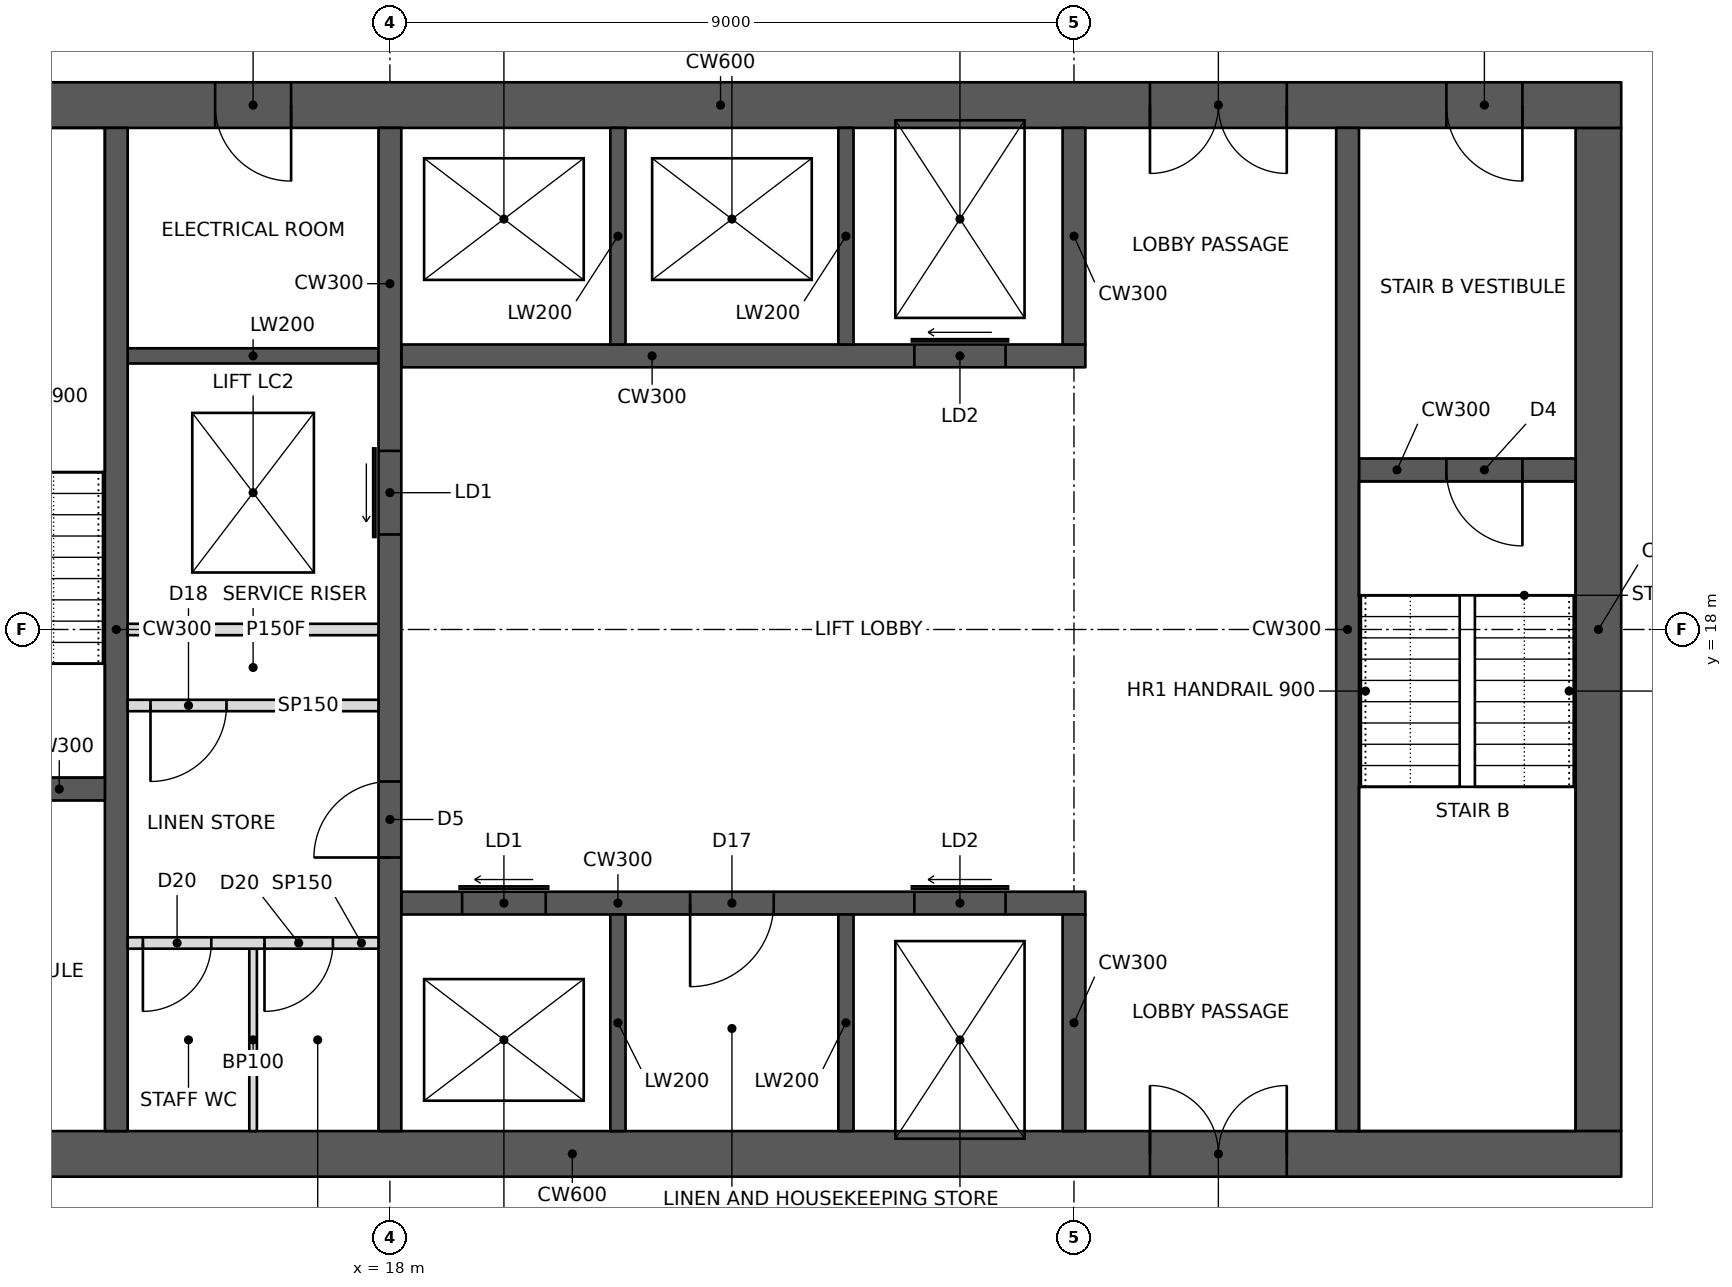
"""IFC4 building model, lengths in metres.
Left out: names, types, materials, properties, quantities, classifications, styles, units other than length and angle.
Written with IfcOpenShell. Run it as: python <this file> out.ifc"""

import sys

from ifc_helpers import new_model, si_unit, direction, frame, frame_2d, origin, place, context, subcontext, project, spatial, rectangle, extrude, element, fill, save


model = new_model("IFC4")
c1 = context("Model", 3, precision=1e-05, world=origin(), true_north=direction((0.0, 1.0)))
c2 = subcontext(c1, "Body", "Model", "MODEL_VIEW")
j1 = project(units=[si_unit("LENGTHUNIT", "METRE"), si_unit("PLANEANGLEUNIT", "RADIAN")], contexts=[c1])
p1 = place(None, origin())
s1 = spatial("IfcSite", under=j1, at=p1, CompositionType="ELEMENT")
p2 = place(p1, origin())
s2 = spatial("IfcBuilding", under=s1, at=p2, CompositionType="ELEMENT")
p3 = place(p2, frame((0.0, 0.0, 163.8)))
s3 = spatial("IfcBuildingStorey", under=s2, at=p3, CompositionType="ELEMENT", Elevation=163.8)
p4 = place(p3, frame((10.8, 11.1, 0.0), z_axis=(0.0, 0.0, 1.0), x_axis=(1.0, 0.0, 0.0)))
e1 = element("IfcWall", 1, at=p4, inside=s3, PredefinedType="SHEAR", context=c2, shape_type="SweptSolid", body=[
    extrude(rectangle(XDim=23.4, YDim=0.6, at=frame_2d((11.7, 0.0))), origin(), (0.0, 0.0, 1.0), 3.4),
])
p5 = place(p4, frame((1.0, 0.0, 0.0)))
e2 = element("IfcOpeningElement", 2, at=p5, cuts=e1, PredefinedType="OPENING", context=c2, shape_type="SweptSolid", body=[
    extrude(rectangle(XDim=1.0, YDim=2.1, at=frame_2d((0.5, 1.05))), frame((0.0, 0.31, 0.0), z_axis=(0.0, -1.0, 0.0), x_axis=(1.0, 0.0, 0.0)), (0.0, 0.0, 1.0), 0.62),
])
p6 = place(p4, frame((17.2, 0.0, 0.0)))
e3 = element("IfcOpeningElement", 3, at=p6, cuts=e1, PredefinedType="OPENING", context=c2, shape_type="SweptSolid", body=[
    extrude(rectangle(XDim=1.8, YDim=2.1, at=frame_2d((0.9, 1.05))), frame((0.0, 0.31, 0.0), z_axis=(0.0, -1.0, 0.0), x_axis=(1.0, 0.0, 0.0)), (0.0, 0.0, 1.0), 0.62),
])
p7 = place(p3, frame((10.8, 24.9, 0.0), z_axis=(0.0, 0.0, 1.0), x_axis=(1.0, 0.0, 0.0)))
e4 = element("IfcWall", 4, at=p7, inside=s3, PredefinedType="SHEAR", context=c2, shape_type="SweptSolid", body=[
    extrude(rectangle(XDim=23.4, YDim=0.6, at=frame_2d((11.7, 0.0))), origin(), (0.0, 0.0, 1.0), 3.4),
])
p8 = place(p7, frame((17.2, 0.0, 0.0)))
e5 = element("IfcOpeningElement", 5, at=p8, cuts=e4, PredefinedType="OPENING", context=c2, shape_type="SweptSolid", body=[
    extrude(rectangle(XDim=1.8, YDim=2.1, at=frame_2d((0.9, 1.05))), frame((0.0, 0.31, 0.0), z_axis=(0.0, -1.0, 0.0), x_axis=(1.0, 0.0, 0.0)), (0.0, 0.0, 1.0), 0.62),
])
p9 = place(p7, frame((21.1, 0.0, 0.0)))
e6 = element("IfcOpeningElement", 6, at=p9, cuts=e4, PredefinedType="OPENING", context=c2, shape_type="SweptSolid", body=[
    extrude(rectangle(XDim=1.0, YDim=2.1, at=frame_2d((0.5, 1.05))), frame((0.0, 0.31, 0.0), z_axis=(0.0, -1.0, 0.0), x_axis=(1.0, 0.0, 0.0)), (0.0, 0.0, 1.0), 0.62),
])
p10 = place(p7, frame((4.9, 0.0, 0.0)))
e7 = element("IfcOpeningElement", 7, at=p10, cuts=e4, PredefinedType="OPENING", context=c2, shape_type="SweptSolid", body=[
    extrude(rectangle(XDim=1.0, YDim=2.1, at=frame_2d((0.5, 1.05))), frame((0.0, 0.31, 0.0), z_axis=(0.0, -1.0, 0.0), x_axis=(1.0, 0.0, 0.0)), (0.0, 0.0, 1.0), 0.62),
])
p11 = place(p3, frame((33.9, 11.4, 0.0), z_axis=(0.0, 0.0, 1.0), x_axis=(0.0, 1.0, 0.0)))
e8 = element("IfcWall", 8, at=p11, inside=s3, PredefinedType="SHEAR", context=c2, shape_type="SweptSolid", body=[
    extrude(rectangle(XDim=13.2, YDim=0.6, at=frame_2d((6.6, 0.0))), origin(), (0.0, 0.0, 1.0), 3.4),
])
p12 = place(p3, frame((14.4, 11.4, 0.0), z_axis=(0.0, 0.0, 1.0), x_axis=(0.0, 1.0, 0.0)))
e9 = element("IfcWall", 9, at=p12, inside=s3, PredefinedType="SHEAR", context=c2, shape_type="SweptSolid", body=[
    extrude(rectangle(XDim=13.2, YDim=0.3, at=frame_2d((6.6, 0.0))), origin(), (0.0, 0.0, 1.0), 3.4),
])
p13 = place(p3, frame((11.4, 15.9, 0.0), z_axis=(0.0, 0.0, 1.0), x_axis=(1.0, 0.0, 0.0)))
e10 = element("IfcWall", 10, at=p13, inside=s3, PredefinedType="SHEAR", context=c2, shape_type="SweptSolid", body=[
    extrude(rectangle(XDim=2.85, YDim=0.3, at=frame_2d((1.425, 0.0))), origin(), (0.0, 0.0, 1.0), 3.4),
])
p14 = place(p13, frame((0.5, 0.0, 0.0)))
e11 = element("IfcOpeningElement", 11, at=p14, cuts=e10, PredefinedType="OPENING", context=c2, shape_type="SweptSolid", body=[
    extrude(rectangle(XDim=1.0, YDim=2.1, at=frame_2d((0.5, 1.05))), frame((0.0, 0.16, 0.0), z_axis=(0.0, -1.0, 0.0), x_axis=(1.0, 0.0, 0.0)), (0.0, 0.0, 1.0), 0.32),
])
p15 = place(p3, frame((18.0, 11.4, 0.0), z_axis=(0.0, 0.0, 1.0), x_axis=(0.0, 1.0, 0.0)))
e12 = element("IfcWall", 12, at=p15, inside=s3, PredefinedType="SHEAR", context=c2, shape_type="SweptSolid", body=[
    extrude(rectangle(XDim=13.2, YDim=0.3, at=frame_2d((6.6, 0.0))), origin(), (0.0, 0.0, 1.0), 3.4),
])
p16 = place(p15, frame((3.6, 0.0, 0.0)))
e13 = element("IfcOpeningElement", 13, at=p16, cuts=e12, PredefinedType="OPENING", context=c2, shape_type="SweptSolid", body=[
    extrude(rectangle(XDim=1.0, YDim=2.1, at=frame_2d((0.5, 1.05))), frame((0.0, 0.16, 0.0), z_axis=(0.0, -1.0, 0.0), x_axis=(1.0, 0.0, 0.0)), (0.0, 0.0, 1.0), 0.32),
])
p17 = place(p15, frame((7.85, 0.0, 0.0)))
e14 = element("IfcOpeningElement", 14, at=p17, cuts=e12, PredefinedType="OPENING", context=c2, shape_type="SweptSolid", body=[
    extrude(rectangle(XDim=1.1, YDim=2.1, at=frame_2d((0.55, 1.05))), frame((0.0, 0.16, 0.0), z_axis=(0.0, -1.0, 0.0), x_axis=(1.0, 0.0, 0.0)), (0.0, 0.0, 1.0), 0.32),
])
p18 = place(p3, frame((14.55, 18.0, 0.0), z_axis=(0.0, 0.0, 1.0), x_axis=(1.0, 0.0, 0.0)))
e15 = element("IfcWall", 15, at=p18, inside=s3, PredefinedType="PARTITIONING", context=c2, shape_type="SweptSolid", body=[
    extrude(rectangle(XDim=3.3, YDim=0.15, at=frame_2d((1.65, 0.0))), origin(), (0.0, 0.0, 1.0), 3.2),
])
p19 = place(p3, frame((18.15, 14.4, 0.0), z_axis=(0.0, 0.0, 1.0), x_axis=(1.0, 0.0, 0.0)))
e16 = element("IfcWall", 16, at=p19, inside=s3, PredefinedType="SHEAR", context=c2, shape_type="SweptSolid", body=[
    extrude(rectangle(XDim=9.0, YDim=0.3, at=frame_2d((4.5, 0.0))), origin(), (0.0, 0.0, 1.0), 3.4),
])
p20 = place(p19, frame((0.8, 0.0, 0.0)))
e17 = element("IfcOpeningElement", 17, at=p20, cuts=e16, PredefinedType="OPENING", context=c2, shape_type="SweptSolid", body=[
    extrude(rectangle(XDim=1.1, YDim=2.1, at=frame_2d((0.55, 1.05))), frame((0.0, 0.16, 0.0), z_axis=(0.0, -1.0, 0.0), x_axis=(1.0, 0.0, 0.0)), (0.0, 0.0, 1.0), 0.32),
])
p21 = place(p19, frame((6.75, 0.0, 0.0)))
e18 = element("IfcOpeningElement", 18, at=p21, cuts=e16, PredefinedType="OPENING", context=c2, shape_type="SweptSolid", body=[
    extrude(rectangle(XDim=1.2, YDim=2.1, at=frame_2d((0.6, 1.05))), frame((0.0, 0.16, 0.0), z_axis=(0.0, -1.0, 0.0), x_axis=(1.0, 0.0, 0.0)), (0.0, 0.0, 1.0), 0.32),
])
p22 = place(p19, frame((3.8, 0.0, 0.0)))
e19 = element("IfcOpeningElement", 19, at=p22, cuts=e16, PredefinedType="OPENING", context=c2, shape_type="SweptSolid", body=[
    extrude(rectangle(XDim=1.1, YDim=2.1, at=frame_2d((0.55, 1.05))), frame((0.0, 0.16, 0.0), z_axis=(0.0, -1.0, 0.0), x_axis=(1.0, 0.0, 0.0)), (0.0, 0.0, 1.0), 0.32),
])
p23 = place(p3, frame((27.0, 11.4, 0.0), z_axis=(0.0, 0.0, 1.0), x_axis=(0.0, 1.0, 0.0)))
e20 = element("IfcWall", 20, at=p23, inside=s3, PredefinedType="SHEAR", context=c2, shape_type="SweptSolid", body=[
    extrude(rectangle(XDim=2.85, YDim=0.3, at=frame_2d((1.425, 0.0))), origin(), (0.0, 0.0, 1.0), 3.4),
])
for number, where, z_axis, x_axis in (
    (21, (21.0, 11.4, 0.0), (0.0, 0.0, 1.0), (0.0, 1.0, 0.0)),
    (22, (24.0, 11.4, 0.0), (0.0, 0.0, 1.0), (0.0, 1.0, 0.0)),
):
    element("IfcWall", number, at=place(p3, frame(where, z_axis=z_axis, x_axis=x_axis)), inside=s3, PredefinedType="SHEAR", context=c2, shape_type="SweptSolid", body=[
        extrude(rectangle(XDim=2.85, YDim=0.2, at=frame_2d((1.425, 0.0))), origin(), (0.0, 0.0, 1.0), 3.4),
    ])
p24 = place(p3, frame((18.15, 21.6, 0.0), z_axis=(0.0, 0.0, 1.0), x_axis=(1.0, 0.0, 0.0)))
e23 = element("IfcWall", 23, at=p24, inside=s3, PredefinedType="SHEAR", context=c2, shape_type="SweptSolid", body=[
    extrude(rectangle(XDim=9.0, YDim=0.3, at=frame_2d((4.5, 0.0))), origin(), (0.0, 0.0, 1.0), 3.4),
])
p25 = place(p24, frame((6.75, 0.0, 0.0)))
e24 = element("IfcOpeningElement", 24, at=p25, cuts=e23, PredefinedType="OPENING", context=c2, shape_type="SweptSolid", body=[
    extrude(rectangle(XDim=1.2, YDim=2.1, at=frame_2d((0.6, 1.05))), frame((0.0, 0.16, 0.0), z_axis=(0.0, -1.0, 0.0), x_axis=(1.0, 0.0, 0.0)), (0.0, 0.0, 1.0), 0.32),
])
p26 = place(p3, frame((27.0, 21.75, 0.0), z_axis=(0.0, 0.0, 1.0), x_axis=(0.0, 1.0, 0.0)))
e25 = element("IfcWall", 25, at=p26, inside=s3, PredefinedType="SHEAR", context=c2, shape_type="SweptSolid", body=[
    extrude(rectangle(XDim=2.85, YDim=0.3, at=frame_2d((1.425, 0.0))), origin(), (0.0, 0.0, 1.0), 3.4),
])
for number, where, z_axis, x_axis in (
    (26, (21.0, 21.75, 0.0), (0.0, 0.0, 1.0), (0.0, 1.0, 0.0)),
    (27, (24.0, 21.75, 0.0), (0.0, 0.0, 1.0), (0.0, 1.0, 0.0)),
):
    element("IfcWall", number, at=place(p3, frame(where, z_axis=z_axis, x_axis=x_axis)), inside=s3, PredefinedType="SHEAR", context=c2, shape_type="SweptSolid", body=[
        extrude(rectangle(XDim=2.85, YDim=0.2, at=frame_2d((1.425, 0.0))), origin(), (0.0, 0.0, 1.0), 3.4),
    ])
p27 = place(p3, frame((30.6, 11.4, 0.0), z_axis=(0.0, 0.0, 1.0), x_axis=(0.0, 1.0, 0.0)))
e28 = element("IfcWall", 28, at=p27, inside=s3, PredefinedType="SHEAR", context=c2, shape_type="SweptSolid", body=[
    extrude(rectangle(XDim=13.2, YDim=0.3, at=frame_2d((6.6, 0.0))), origin(), (0.0, 0.0, 1.0), 3.4),
])
p28 = place(p3, frame((30.75, 20.1, 0.0), z_axis=(0.0, 0.0, 1.0), x_axis=(1.0, 0.0, 0.0)))
e29 = element("IfcWall", 29, at=p28, inside=s3, PredefinedType="SHEAR", context=c2, shape_type="SweptSolid", body=[
    extrude(rectangle(XDim=2.85, YDim=0.3, at=frame_2d((1.425, 0.0))), origin(), (0.0, 0.0, 1.0), 3.4),
])
p29 = place(p28, frame((1.15, 0.0, 0.0)))
e30 = element("IfcOpeningElement", 30, at=p29, cuts=e29, PredefinedType="OPENING", context=c2, shape_type="SweptSolid", body=[
    extrude(rectangle(XDim=1.0, YDim=2.1, at=frame_2d((0.5, 1.05))), frame((0.0, 0.16, 0.0), z_axis=(0.0, -1.0, 0.0), x_axis=(1.0, 0.0, 0.0)), (0.0, 0.0, 1.0), 0.32),
])
p30 = place(p3, frame((14.55, 21.6, 0.0), z_axis=(0.0, 0.0, 1.0), x_axis=(1.0, 0.0, 0.0)))
e31 = element("IfcWall", 31, at=p30, inside=s3, PredefinedType="SHEAR", context=c2, shape_type="SweptSolid", body=[
    extrude(rectangle(XDim=3.3, YDim=0.2, at=frame_2d((1.65, 0.0))), origin(), (0.0, 0.0, 1.0), 3.4),
])
p31 = place(p3, frame((14.55, 17.0, 0.0), z_axis=(0.0, 0.0, 1.0), x_axis=(1.0, 0.0, 0.0)))
e32 = element("IfcWall", 32, at=p31, inside=s3, PredefinedType="PARTITIONING", context=c2, shape_type="SweptSolid", body=[
    extrude(rectangle(XDim=3.3, YDim=0.15, at=frame_2d((1.65, 0.0))), origin(), (0.0, 0.0, 1.0), 3.2),
])
p32 = place(p31, frame((0.3, 0.0, 0.0)))
e33 = element("IfcOpeningElement", 33, at=p32, cuts=e32, PredefinedType="OPENING", context=c2, shape_type="SweptSolid", body=[
    extrude(rectangle(XDim=1.0, YDim=2.1, at=frame_2d((0.5, 1.05))), frame((0.0, 0.085, 0.0), z_axis=(0.0, -1.0, 0.0), x_axis=(1.0, 0.0, 0.0)), (0.0, 0.0, 1.0), 0.17),
])
p33 = place(p3, frame((14.55, 13.875, 0.0), z_axis=(0.0, 0.0, 1.0), x_axis=(1.0, 0.0, 0.0)))
e34 = element("IfcWall", 34, at=p33, inside=s3, PredefinedType="PARTITIONING", context=c2, shape_type="SweptSolid", body=[
    extrude(rectangle(XDim=3.3, YDim=0.15, at=frame_2d((1.65, 0.0))), origin(), (0.0, 0.0, 1.0), 3.2),
])
p34 = place(p33, frame((0.2, 0.0, 0.0)))
e35 = element("IfcOpeningElement", 35, at=p34, cuts=e34, PredefinedType="OPENING", context=c2, shape_type="SweptSolid", body=[
    extrude(rectangle(XDim=0.9, YDim=2.1, at=frame_2d((0.45, 1.05))), frame((0.0, 0.085, 0.0), z_axis=(0.0, -1.0, 0.0), x_axis=(1.0, 0.0, 0.0)), (0.0, 0.0, 1.0), 0.17),
])
p35 = place(p33, frame((1.8, 0.0, 0.0)))
e36 = element("IfcOpeningElement", 36, at=p35, cuts=e34, PredefinedType="OPENING", context=c2, shape_type="SweptSolid", body=[
    extrude(rectangle(XDim=0.9, YDim=2.1, at=frame_2d((0.45, 1.05))), frame((0.0, 0.085, 0.0), z_axis=(0.0, -1.0, 0.0), x_axis=(1.0, 0.0, 0.0)), (0.0, 0.0, 1.0), 0.17),
])
p36 = place(p3, frame((16.2, 11.4, 0.0), z_axis=(0.0, 0.0, 1.0), x_axis=(0.0, 1.0, 0.0)))
e37 = element("IfcWall", 37, at=p36, inside=s3, PredefinedType="PARTITIONING", context=c2, shape_type="SweptSolid", body=[
    extrude(rectangle(XDim=2.4, YDim=0.1, at=frame_2d((1.2, 0.0))), origin(), (0.0, 0.0, 1.0), 3.2),
])
p37 = place(p32, frame((1.0, 0.0, 0.0), z_axis=(0.0, 0.0, 1.0), x_axis=(-1.0, 0.0, 0.0)))
e38 = element("IfcDoor", 38, at=p37, inside=s3, OperationType="SINGLE_SWING_RIGHT", PredefinedType="DOOR", context=c2, shape_type="SweptSolid", body=[
    extrude(rectangle(XDim=1.0, YDim=2.1, at=frame_2d((0.5, 1.05))), frame((0.0, 0.025, 0.0), z_axis=(0.0, -1.0, 0.0), x_axis=(1.0, 0.0, 0.0)), (0.0, 0.0, 1.0), 0.05),
])
fill(e33, e38)
p38 = place(p34, frame((0.9, 0.0, 0.0), z_axis=(0.0, 0.0, 1.0), x_axis=(-1.0, 0.0, 0.0)))
e39 = element("IfcDoor", 39, at=p38, inside=s3, OperationType="SINGLE_SWING_RIGHT", PredefinedType="DOOR", context=c2, shape_type="SweptSolid", body=[
    extrude(rectangle(XDim=0.9, YDim=2.1, at=frame_2d((0.45, 1.05))), frame((0.0, 0.025, 0.0), z_axis=(0.0, -1.0, 0.0), x_axis=(1.0, 0.0, 0.0)), (0.0, 0.0, 1.0), 0.05),
])
fill(e35, e39)
p39 = place(p35, frame((0.9, 0.0, 0.0), z_axis=(0.0, 0.0, 1.0), x_axis=(-1.0, 0.0, 0.0)))
e40 = element("IfcDoor", 40, at=p39, inside=s3, OperationType="SINGLE_SWING_RIGHT", PredefinedType="DOOR", context=c2, shape_type="SweptSolid", body=[
    extrude(rectangle(XDim=0.9, YDim=2.1, at=frame_2d((0.45, 1.05))), frame((0.0, 0.025, 0.0), z_axis=(0.0, -1.0, 0.0), x_axis=(1.0, 0.0, 0.0)), (0.0, 0.0, 1.0), 0.05),
])
fill(e36, e40)
p40 = place(p6, origin())
e41 = element("IfcDoor", 41, at=p40, inside=s3, OperationType="DOUBLE_DOOR_SINGLE_SWING", PredefinedType="DOOR", context=c2, shape_type="SweptSolid", body=[
    extrude(rectangle(XDim=1.8, YDim=2.1, at=frame_2d((0.9, 1.05))), frame((0.0, 0.025, 0.0), z_axis=(0.0, -1.0, 0.0), x_axis=(1.0, 0.0, 0.0)), (0.0, 0.0, 1.0), 0.05),
])
fill(e3, e41)
p41 = place(p8, frame((1.8, 0.0, 0.0), z_axis=(0.0, 0.0, 1.0), x_axis=(-1.0, 0.0, 0.0)))
e42 = element("IfcDoor", 42, at=p41, inside=s3, OperationType="DOUBLE_DOOR_SINGLE_SWING", PredefinedType="DOOR", context=c2, shape_type="SweptSolid", body=[
    extrude(rectangle(XDim=1.8, YDim=2.1, at=frame_2d((0.9, 1.05))), frame((0.0, 0.025, 0.0), z_axis=(0.0, -1.0, 0.0), x_axis=(1.0, 0.0, 0.0)), (0.0, 0.0, 1.0), 0.05),
])
fill(e5, e42)
p42 = place(p9, frame((1.0, 0.0, 0.0), z_axis=(0.0, 0.0, 1.0), x_axis=(-1.0, 0.0, 0.0)))
e43 = element("IfcDoor", 43, at=p42, inside=s3, OperationType="SINGLE_SWING_LEFT", PredefinedType="DOOR", context=c2, shape_type="SweptSolid", body=[
    extrude(rectangle(XDim=1.0, YDim=2.1, at=frame_2d((0.5, 1.05))), frame((0.0, 0.025, 0.0), z_axis=(0.0, -1.0, 0.0), x_axis=(1.0, 0.0, 0.0)), (0.0, 0.0, 1.0), 0.05),
])
fill(e6, e43)
p43 = place(p29, frame((1.0, 0.0, 0.0), z_axis=(0.0, 0.0, 1.0), x_axis=(-1.0, 0.0, 0.0)))
e44 = element("IfcDoor", 44, at=p43, inside=s3, OperationType="SINGLE_SWING_LEFT", PredefinedType="DOOR", context=c2, shape_type="SweptSolid", body=[
    extrude(rectangle(XDim=1.0, YDim=2.1, at=frame_2d((0.5, 1.05))), frame((0.0, 0.025, 0.0), z_axis=(0.0, -1.0, 0.0), x_axis=(1.0, 0.0, 0.0)), (0.0, 0.0, 1.0), 0.05),
])
fill(e30, e44)
p44 = place(p16, origin())
e45 = element("IfcDoor", 45, at=p44, inside=s3, OperationType="SINGLE_SWING_LEFT", PredefinedType="DOOR", context=c2, shape_type="SweptSolid", body=[
    extrude(rectangle(XDim=1.0, YDim=2.1, at=frame_2d((0.5, 1.05))), frame((0.0, 0.025, 0.0), z_axis=(0.0, -1.0, 0.0), x_axis=(1.0, 0.0, 0.0)), (0.0, 0.0, 1.0), 0.05),
])
fill(e13, e45)
p45 = place(p10, frame((1.0, 0.0, 0.0), z_axis=(0.0, 0.0, 1.0), x_axis=(-1.0, 0.0, 0.0)))
e46 = element("IfcDoor", 46, at=p45, inside=s3, OperationType="SINGLE_SWING_LEFT", PredefinedType="DOOR", context=c2, shape_type="SweptSolid", body=[
    extrude(rectangle(XDim=1.0, YDim=2.1, at=frame_2d((0.5, 1.05))), frame((0.0, 0.025, 0.0), z_axis=(0.0, -1.0, 0.0), x_axis=(1.0, 0.0, 0.0)), (0.0, 0.0, 1.0), 0.05),
])
fill(e7, e46)
p46 = place(p20, origin())
e47 = element("IfcDoor", 47, at=p46, inside=s3, OperationType="SLIDING_TO_LEFT", PredefinedType="DOOR", context=c2, shape_type="SweptSolid", body=[
    extrude(rectangle(XDim=1.1, YDim=2.1, at=frame_2d((0.55, 1.05))), frame((0.0, 0.025, 0.0), z_axis=(0.0, -1.0, 0.0), x_axis=(1.0, 0.0, 0.0)), (0.0, 0.0, 1.0), 0.05),
])
fill(e17, e47)
p47 = place(p17, origin())
e48 = element("IfcDoor", 48, at=p47, inside=s3, OperationType="SLIDING_TO_LEFT", PredefinedType="DOOR", context=c2, shape_type="SweptSolid", body=[
    extrude(rectangle(XDim=1.1, YDim=2.1, at=frame_2d((0.55, 1.05))), frame((0.0, 0.025, 0.0), z_axis=(0.0, -1.0, 0.0), x_axis=(1.0, 0.0, 0.0)), (0.0, 0.0, 1.0), 0.05),
])
fill(e14, e48)
p48 = place(p21, origin())
e49 = element("IfcDoor", 49, at=p48, inside=s3, OperationType="SLIDING_TO_LEFT", PredefinedType="DOOR", context=c2, shape_type="SweptSolid", body=[
    extrude(rectangle(XDim=1.2, YDim=2.1, at=frame_2d((0.6, 1.05))), frame((0.0, 0.025, 0.0), z_axis=(0.0, -1.0, 0.0), x_axis=(1.0, 0.0, 0.0)), (0.0, 0.0, 1.0), 0.05),
])
fill(e18, e49)
p49 = place(p25, origin())
e50 = element("IfcDoor", 50, at=p49, inside=s3, OperationType="SLIDING_TO_LEFT", PredefinedType="DOOR", context=c2, shape_type="SweptSolid", body=[
    extrude(rectangle(XDim=1.2, YDim=2.1, at=frame_2d((0.6, 1.05))), frame((0.0, 0.025, 0.0), z_axis=(0.0, -1.0, 0.0), x_axis=(1.0, 0.0, 0.0)), (0.0, 0.0, 1.0), 0.05),
])
fill(e24, e50)
p50 = place(p22, frame((1.1, 0.0, 0.0), z_axis=(0.0, 0.0, 1.0), x_axis=(-1.0, 0.0, 0.0)))
e51 = element("IfcDoor", 51, at=p50, inside=s3, OperationType="SINGLE_SWING_RIGHT", PredefinedType="DOOR", context=c2, shape_type="SweptSolid", body=[
    extrude(rectangle(XDim=1.1, YDim=2.1, at=frame_2d((0.55, 1.05))), frame((0.0, 0.025, 0.0), z_axis=(0.0, -1.0, 0.0), x_axis=(1.0, 0.0, 0.0)), (0.0, 0.0, 1.0), 0.05),
])
fill(e19, e51)
save(model, sys.argv[1])
